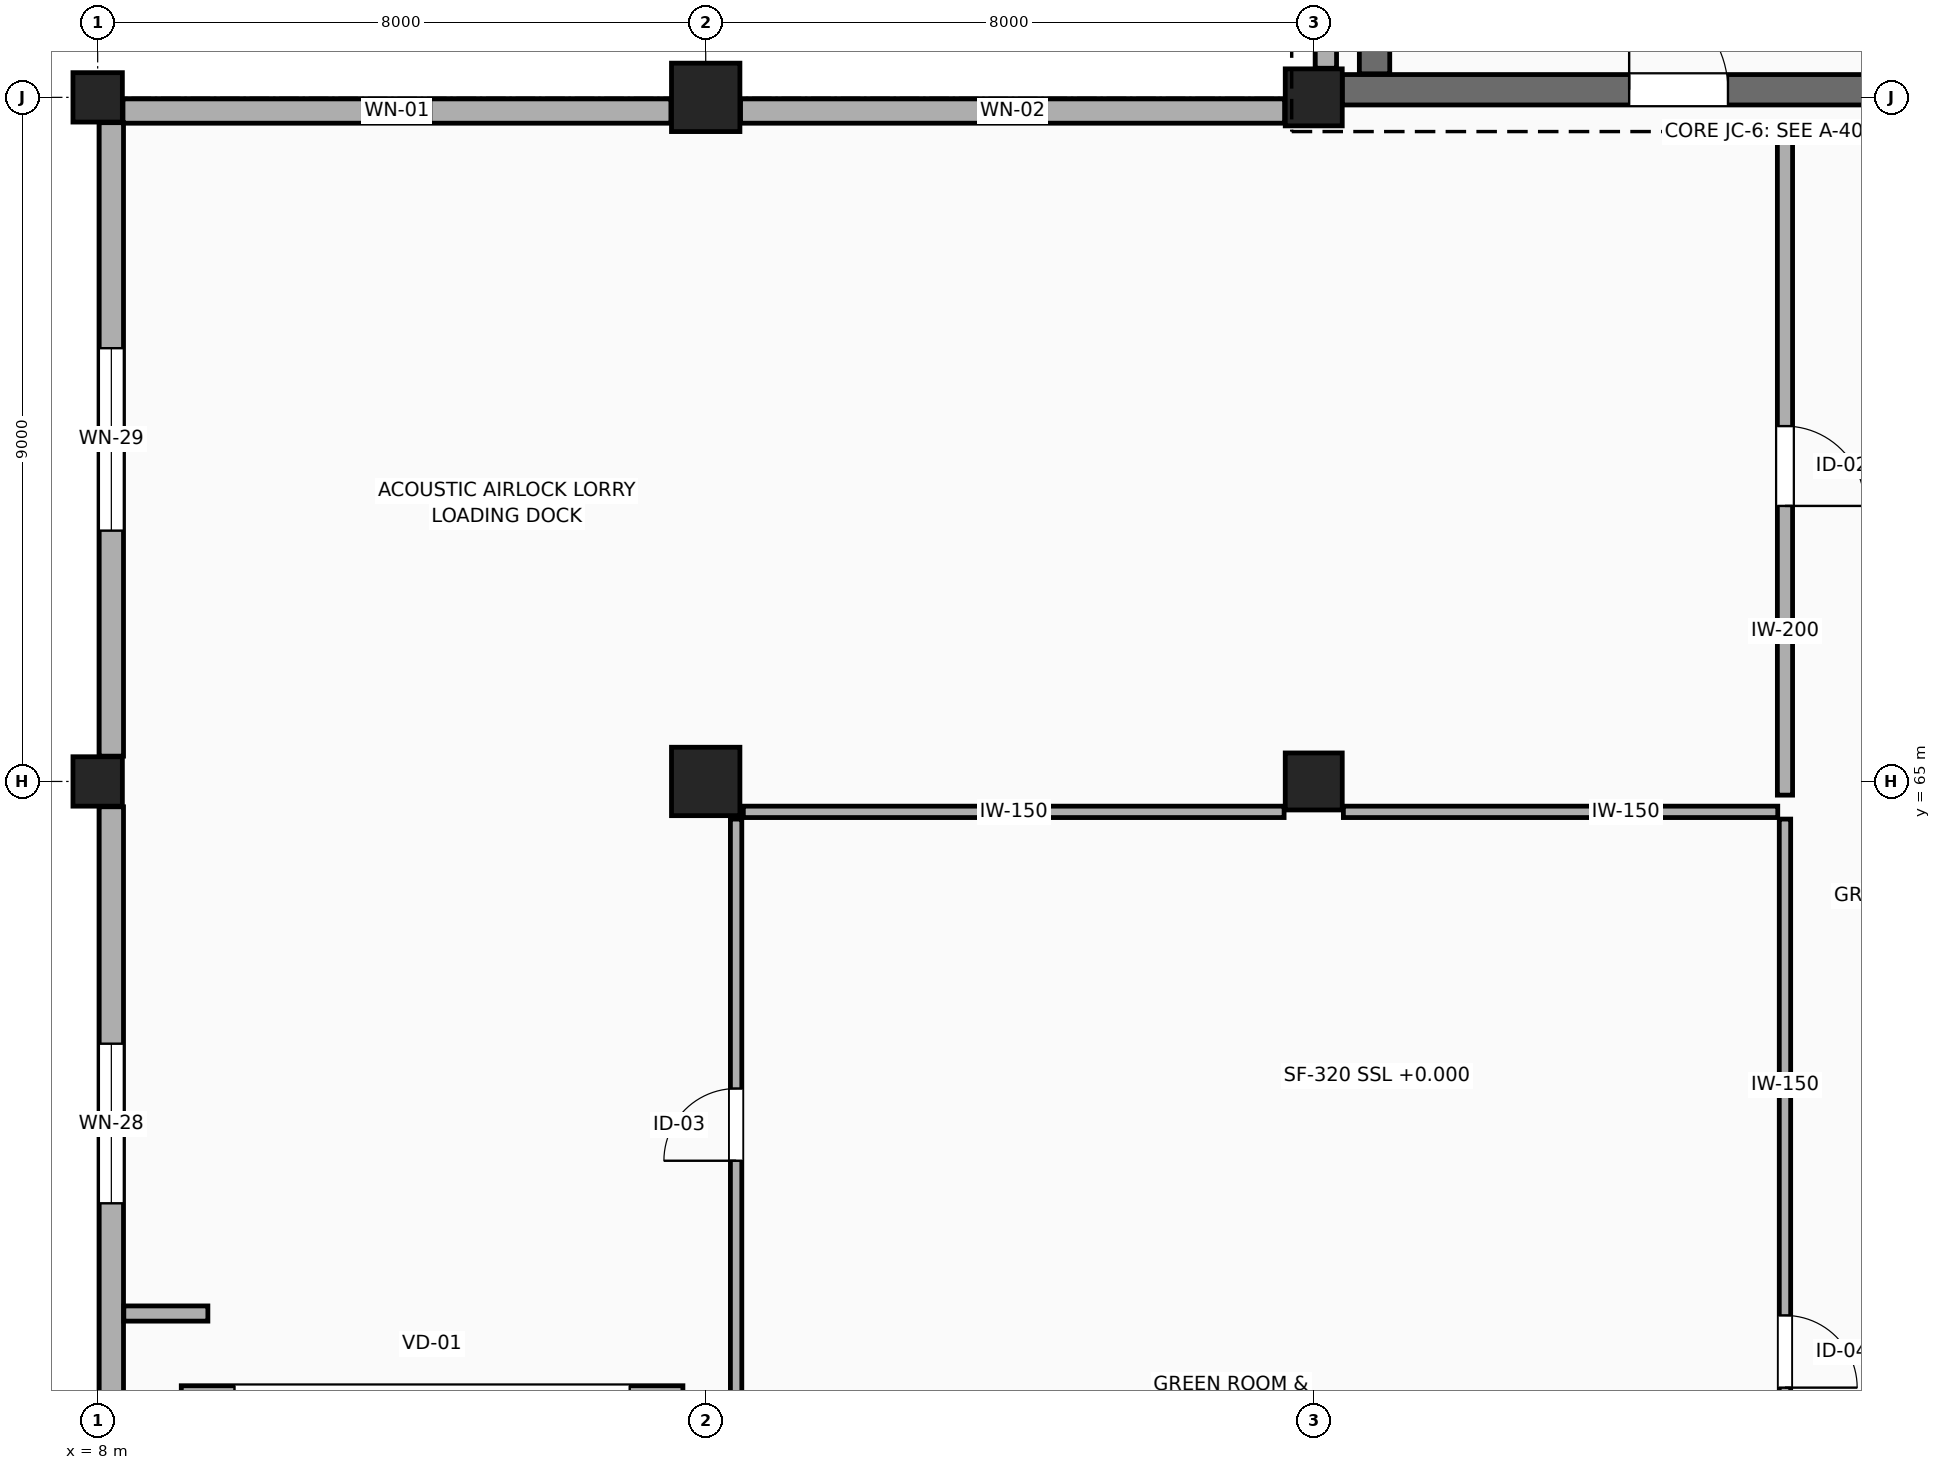
"""IFC4 building model, lengths in metres.
Left out: names, types, materials, properties, quantities, classifications, styles, units other than length and angle.
Written with IfcOpenShell. Run it as: python <this file> out.ifc"""

import sys

from ifc_helpers import new_model, si_unit, direction, frame, frame_2d, origin, origin_2d, place, context, subcontext, project, spatial, rectangle, extrude, element, fill, save


model = new_model("IFC4")
c1 = context("Model", 3, precision=1e-05, world=origin(), true_north=direction((0.0, 1.0)))
c2 = subcontext(c1, "Body", "Model", "MODEL_VIEW")
j1 = project(units=[si_unit("LENGTHUNIT", "METRE"), si_unit("PLANEANGLEUNIT", "RADIAN")], contexts=[c1])
p1 = place(None, origin())
s1 = spatial("IfcSite", under=j1, at=p1, CompositionType="ELEMENT")
p2 = place(p1, origin())
s2 = spatial("IfcBuilding", under=s1, at=p2, CompositionType="ELEMENT")
p3 = place(p2, origin())
s3 = spatial("IfcBuildingStorey", under=s2, at=p3, CompositionType="ELEMENT", Elevation=0.0)
for number, where, z_axis, x_axis in (
    (1, (8.0, 65.0, 0.0), (0.0, 0.0, 1.0), (1.0, 0.0, 0.0)),
    (2, (8.0, 74.0, 0.0), (0.0, 0.0, 1.0), (1.0, 0.0, 0.0)),
):
    element("IfcColumn", number, at=place(p3, frame(where, z_axis=z_axis, x_axis=x_axis)), inside=s3, PredefinedType="COLUMN", context=c2, shape_type="SweptSolid", body=[
        extrude(rectangle(XDim=0.65, YDim=0.65, at=origin_2d()), origin(), (0.0, 0.0, 1.0), 5.36),
    ])
for number, where, z_axis, x_axis in (
    (3, (16.0, 65.0, 0.0), (0.0, 0.0, 1.0), (1.0, 0.0, 0.0)),
    (4, (16.0, 74.0, 0.0), (0.0, 0.0, 1.0), (1.0, 0.0, 0.0)),
):
    element("IfcColumn", number, at=place(p3, frame(where, z_axis=z_axis, x_axis=x_axis)), inside=s3, PredefinedType="COLUMN", context=c2, shape_type="SweptSolid", body=[
        extrude(rectangle(XDim=0.9, YDim=0.9, at=origin_2d()), origin(), (0.0, 0.0, 1.0), 5.4),
    ])
for number, where, z_axis, x_axis in (
    (5, (24.0, 65.0, 0.0), (0.0, 0.0, 1.0), (1.0, 0.0, 0.0)),
    (6, (24.0, 74.0, 0.0), (0.0, 0.0, 1.0), (1.0, 0.0, 0.0)),
):
    element("IfcColumn", number, at=place(p3, frame(where, z_axis=z_axis, x_axis=x_axis)), inside=s3, PredefinedType="COLUMN", context=c2, shape_type="SweptSolid", body=[
        extrude(rectangle(XDim=0.75, YDim=0.75, at=origin_2d()), origin(), (0.0, 0.0, 1.0), 5.4),
    ])
p4 = place(p3, frame((8.333, 73.82, 0.0), z_axis=(0.0, 0.0, 1.0), x_axis=(1.0, 0.0, 0.0)))
e7 = element("IfcWall", 7, at=p4, inside=s3, PredefinedType="STANDARD", context=c2, shape_type="SweptSolid", body=[
    extrude(rectangle(XDim=7.209, YDim=0.32, at=frame_2d((3.604, 0.0))), origin(), (0.0, 0.0, 1.0), 4.605),
])
p5 = place(p4, frame((3.154, 0.0, 0.95)))
e8 = element("IfcOpeningElement", 8, at=p5, cuts=e7, PredefinedType="OPENING", context=c2, shape_type="SweptSolid", body=[
    extrude(rectangle(XDim=0.9, YDim=1.2, at=frame_2d((0.45, 0.6))), frame((0.0, 0.17, 0.0), z_axis=(0.0, -1.0, 0.0), x_axis=(1.0, 0.0, 0.0)), (0.0, 0.0, 1.0), 0.34),
])
p6 = place(p3, frame((16.458, 73.82, 0.0), z_axis=(0.0, 0.0, 1.0), x_axis=(1.0, 0.0, 0.0)))
e9 = element("IfcWall", 9, at=p6, inside=s3, PredefinedType="STANDARD", context=c2, shape_type="SweptSolid", body=[
    extrude(rectangle(XDim=7.159, YDim=0.32, at=frame_2d((3.58, 0.0))), origin(), (0.0, 0.0, 1.0), 4.655),
])
p7 = place(p6, frame((3.13, 0.0, 0.95)))
e10 = element("IfcOpeningElement", 10, at=p7, cuts=e9, PredefinedType="OPENING", context=c2, shape_type="SweptSolid", body=[
    extrude(rectangle(XDim=0.9, YDim=1.5, at=frame_2d((0.45, 0.75))), frame((0.0, 0.17, 0.0), z_axis=(0.0, -1.0, 0.0), x_axis=(1.0, 0.0, 0.0)), (0.0, 0.0, 1.0), 0.34),
])
p8 = place(p3, frame((24.16, 74.383, 0.0), z_axis=(0.0, 0.0, 1.0), x_axis=(0.0, 1.0, 0.0)))
e11 = element("IfcWall", 11, at=p8, inside=s3, PredefinedType="STANDARD", context=c2, shape_type="SweptSolid", body=[
    extrude(rectangle(XDim=8.284, YDim=0.28, at=frame_2d((4.142, 0.0))), origin(), (0.0, 0.0, 1.0), 4.755),
])
p9 = place(p8, frame((3.692, 0.0, 0.95)))
e12 = element("IfcOpeningElement", 12, at=p9, cuts=e11, PredefinedType="OPENING", context=c2, shape_type="SweptSolid", body=[
    extrude(rectangle(XDim=0.9, YDim=1.8, at=frame_2d((0.45, 0.9))), frame((0.0, 0.15, 0.0), z_axis=(0.0, -1.0, 0.0), x_axis=(1.0, 0.0, 0.0)), (0.0, 0.0, 1.0), 0.3),
])
p10 = place(p3, frame((8.18, 56.333, 0.0), z_axis=(0.0, 0.0, 1.0), x_axis=(0.0, 1.0, 0.0)))
e13 = element("IfcWall", 13, at=p10, inside=s3, PredefinedType="STANDARD", context=c2, shape_type="SweptSolid", body=[
    extrude(rectangle(XDim=8.334, YDim=0.32, at=frame_2d((4.167, 0.0))), origin(), (0.0, 0.0, 1.0), 4.655),
])
p11 = place(p10, frame((3.117, 0.0, 0.95)))
e14 = element("IfcOpeningElement", 14, at=p11, cuts=e13, PredefinedType="OPENING", context=c2, shape_type="SweptSolid", body=[
    extrude(rectangle(XDim=2.1, YDim=2.1, at=frame_2d((1.05, 1.05))), frame((0.0, 0.17, 0.0), z_axis=(0.0, -1.0, 0.0), x_axis=(1.0, 0.0, 0.0)), (0.0, 0.0, 1.0), 0.34),
])
p12 = place(p3, frame((8.18, 65.333, 0.0), z_axis=(0.0, 0.0, 1.0), x_axis=(0.0, 1.0, 0.0)))
e15 = element("IfcWall", 15, at=p12, inside=s3, PredefinedType="STANDARD", context=c2, shape_type="SweptSolid", body=[
    extrude(rectangle(XDim=8.334, YDim=0.32, at=frame_2d((4.167, 0.0))), origin(), (0.0, 0.0, 1.0), 4.105),
])
p13 = place(p12, frame((2.967, 0.0, 0.95)))
e16 = element("IfcOpeningElement", 16, at=p13, cuts=e15, PredefinedType="OPENING", context=c2, shape_type="SweptSolid", body=[
    extrude(rectangle(XDim=2.4, YDim=1.2, at=frame_2d((1.2, 0.6))), frame((0.0, 0.17, 0.0), z_axis=(0.0, -1.0, 0.0), x_axis=(1.0, 0.0, 0.0)), (0.0, 0.0, 1.0), 0.34),
])
p14 = place(p3, frame((9.1, 56.85, 0.0), z_axis=(0.0, 0.0, 1.0), x_axis=(1.0, 0.0, 0.0)))
e17 = element("IfcWall", 17, at=p14, inside=s3, PredefinedType="STANDARD", context=c2, shape_type="SweptSolid", body=[
    extrude(rectangle(XDim=6.6, YDim=0.4, at=frame_2d((3.3, 0.0))), origin(), (0.0, 0.0, 1.0), 4.85),
])
p15 = place(p14, frame((0.7, 0.0, 0.0)))
e18 = element("IfcOpeningElement", 18, at=p15, cuts=e17, PredefinedType="OPENING", context=c2, shape_type="SweptSolid", body=[
    extrude(rectangle(XDim=5.2, YDim=3.6, at=frame_2d((2.6, 1.8))), frame((0.0, 0.21, 0.0), z_axis=(0.0, -1.0, 0.0), x_axis=(1.0, 0.0, 0.0)), (0.0, 0.0, 1.0), 0.42),
])
p16 = place(p3, frame((24.374, 74.1, 0.0), z_axis=(0.0, 0.0, 1.0), x_axis=(1.0, 0.0, 0.0)))
e19 = element("IfcWall", 19, at=p16, inside=s3, PredefinedType="SHEAR", context=c2, shape_type="SweptSolid", body=[
    extrude(rectangle(XDim=8.626, YDim=0.4, at=frame_2d((4.313, 0.0))), origin(), (0.0, 0.0, 1.0), 5.12),
])
p17 = place(p16, frame((3.776, 0.0, 0.0)))
e20 = element("IfcOpeningElement", 20, at=p17, cuts=e19, PredefinedType="OPENING", context=c2, shape_type="SweptSolid", body=[
    extrude(rectangle(XDim=1.3, YDim=2.15, at=frame_2d((0.65, 1.075))), frame((0.0, 0.21, 0.0), z_axis=(0.0, -1.0, 0.0), x_axis=(1.0, 0.0, 0.0)), (0.0, 0.0, 1.0), 0.42),
])
p18 = place(p3, frame((24.8, 82.69, 0.0), z_axis=(0.0, 0.0, 1.0), x_axis=(0.0, -1.0, 0.0)))
e21 = element("IfcWall", 21, at=p18, inside=s3, PredefinedType="SHEAR", context=c2, shape_type="SweptSolid", body=[
    extrude(rectangle(XDim=8.38, YDim=0.4, at=frame_2d((4.19, 0.0))), origin(), (0.0, 0.0, 1.0), 5.12),
])
p19 = place(p3, frame((16.495, 64.6, 0.0), z_axis=(0.0, 0.0, 1.0), x_axis=(1.0, 0.0, 0.0)))
e22 = element("IfcWall", 22, at=p19, inside=s3, PredefinedType="PARTITIONING", context=c2, shape_type="SweptSolid", body=[
    extrude(rectangle(XDim=7.115, YDim=0.15, at=frame_2d((3.558, 0.0))), origin(), (0.0, 0.0, 1.0), 4.25),
])
p20 = place(p3, frame((24.39, 64.6, 0.0), z_axis=(0.0, 0.0, 1.0), x_axis=(1.0, 0.0, 0.0)))
e23 = element("IfcWall", 23, at=p20, inside=s3, PredefinedType="PARTITIONING", context=c2, shape_type="SweptSolid", body=[
    extrude(rectangle(XDim=5.715, YDim=0.15, at=frame_2d((2.857, 0.0))), origin(), (0.0, 0.0, 1.0), 4.35),
])
p21 = place(p3, frame((30.2, 64.505, 0.0), z_axis=(0.0, 0.0, 1.0), x_axis=(0.0, -1.0, 0.0)))
e24 = element("IfcWall", 24, at=p21, inside=s3, PredefinedType="PARTITIONING", context=c2, shape_type="SweptSolid", body=[
    extrude(rectangle(XDim=14.01, YDim=0.15, at=frame_2d((7.005, 0.0))), origin(), (0.0, 0.0, 1.0), 5.11),
])
p22 = place(p21, frame((6.53, 0.0, 0.0)))
e25 = element("IfcOpeningElement", 25, at=p22, cuts=e24, PredefinedType="OPENING", context=c2, shape_type="SweptSolid", body=[
    extrude(rectangle(XDim=0.95, YDim=2.15, at=frame_2d((0.475, 1.075))), frame((0.0, 0.085, 0.0), z_axis=(0.0, -1.0, 0.0), x_axis=(1.0, 0.0, 0.0)), (0.0, 0.0, 1.0), 0.17),
])
p23 = place(p3, frame((16.4, 56.465, 0.0), z_axis=(0.0, 0.0, 1.0), x_axis=(0.0, 1.0, 0.0)))
e26 = element("IfcWall", 26, at=p23, inside=s3, PredefinedType="PARTITIONING", context=c2, shape_type="SweptSolid", body=[
    extrude(rectangle(XDim=8.04, YDim=0.15, at=frame_2d((4.02, 0.0))), origin(), (0.0, 0.0, 1.0), 5.4),
])
p24 = place(p23, frame((3.545, 0.0, 0.0)))
e27 = element("IfcOpeningElement", 27, at=p24, cuts=e26, PredefinedType="OPENING", context=c2, shape_type="SweptSolid", body=[
    extrude(rectangle(XDim=0.95, YDim=2.15, at=frame_2d((0.475, 1.075))), frame((0.0, 0.085, 0.0), z_axis=(0.0, -1.0, 0.0), x_axis=(1.0, 0.0, 0.0)), (0.0, 0.0, 1.0), 0.17),
])
p25 = place(p3, frame((30.2, 73.48, 0.0), z_axis=(0.0, 0.0, 1.0), x_axis=(0.0, -1.0, 0.0)))
e28 = element("IfcWall", 28, at=p25, inside=s3, PredefinedType="PARTITIONING", context=c2, shape_type="SweptSolid", body=[
    extrude(rectangle(XDim=8.66, YDim=0.2, at=frame_2d((4.33, 0.0))), origin(), (0.0, 0.0, 1.0), 5.11),
])
p26 = place(p25, frame((3.805, 0.0, 0.0)))
e29 = element("IfcOpeningElement", 29, at=p26, cuts=e28, PredefinedType="OPENING", context=c2, shape_type="SweptSolid", body=[
    extrude(rectangle(XDim=1.05, YDim=2.15, at=frame_2d((0.525, 1.075))), frame((0.0, 0.11, 0.0), z_axis=(0.0, -1.0, 0.0), x_axis=(1.0, 0.0, 0.0)), (0.0, 0.0, 1.0), 0.22),
])
p27 = place(p3, frame((9.45, 58.0, 0.0), z_axis=(0.0, 0.0, 1.0), x_axis=(-1.0, 0.0, 0.0)))
e30 = element("IfcWall", 30, at=p27, inside=s3, PredefinedType="PARTITIONING", context=c2, shape_type="SweptSolid", body=[
    extrude(rectangle(XDim=1.106, YDim=0.2, at=frame_2d((0.553, 0.0))), origin(), (0.0, 0.0, 1.0), 5.17),
])
p28 = place(p5, origin())
e31 = element("IfcWindow", 31, at=p28, inside=s3, PartitioningType="SINGLE_PANEL", PredefinedType="WINDOW", context=c2, shape_type="SweptSolid", body=[
    extrude(rectangle(XDim=0.9, YDim=1.2, at=frame_2d((0.45, 0.6))), frame((0.0, 0.03, 0.0), z_axis=(0.0, -1.0, 0.0), x_axis=(1.0, 0.0, 0.0)), (0.0, 0.0, 1.0), 0.06),
])
fill(e8, e31)
p29 = place(p7, origin())
e32 = element("IfcWindow", 32, at=p29, inside=s3, PartitioningType="SINGLE_PANEL", PredefinedType="WINDOW", context=c2, shape_type="SweptSolid", body=[
    extrude(rectangle(XDim=0.9, YDim=1.5, at=frame_2d((0.45, 0.75))), frame((0.0, 0.03, 0.0), z_axis=(0.0, -1.0, 0.0), x_axis=(1.0, 0.0, 0.0)), (0.0, 0.0, 1.0), 0.06),
])
fill(e10, e32)
p30 = place(p11, origin())
e33 = element("IfcWindow", 33, at=p30, inside=s3, PartitioningType="SINGLE_PANEL", PredefinedType="LIGHTDOME", context=c2, shape_type="SweptSolid", body=[
    extrude(rectangle(XDim=2.1, YDim=2.1, at=frame_2d((1.05, 1.05))), frame((0.0, 0.03, 0.0), z_axis=(0.0, -1.0, 0.0), x_axis=(1.0, 0.0, 0.0)), (0.0, 0.0, 1.0), 0.06),
])
fill(e14, e33)
p31 = place(p13, origin())
e34 = element("IfcWindow", 34, at=p31, inside=s3, PartitioningType="SINGLE_PANEL", PredefinedType="SKYLIGHT", context=c2, shape_type="SweptSolid", body=[
    extrude(rectangle(XDim=2.4, YDim=1.2, at=frame_2d((1.2, 0.6))), frame((0.0, 0.03, 0.0), z_axis=(0.0, -1.0, 0.0), x_axis=(1.0, 0.0, 0.0)), (0.0, 0.0, 1.0), 0.06),
])
fill(e16, e34)
p32 = place(p17, origin())
e35 = element("IfcDoor", 35, at=p32, inside=s3, OperationType="SINGLE_SWING_LEFT", PredefinedType="DOOR", context=c2, shape_type="SweptSolid", body=[
    extrude(rectangle(XDim=1.3, YDim=2.15, at=frame_2d((0.65, 1.075))), frame((0.0, 0.025, 0.0), z_axis=(0.0, -1.0, 0.0), x_axis=(1.0, 0.0, 0.0)), (0.0, 0.0, 1.0), 0.05),
])
fill(e20, e35)
p33 = place(p22, origin())
e36 = element("IfcDoor", 36, at=p33, inside=s3, OperationType="SINGLE_SWING_RIGHT", PredefinedType="DOOR", context=c2, shape_type="SweptSolid", body=[
    extrude(rectangle(XDim=0.95, YDim=2.15, at=frame_2d((0.475, 1.075))), frame((0.0, 0.025, 0.0), z_axis=(0.0, -1.0, 0.0), x_axis=(1.0, 0.0, 0.0)), (0.0, 0.0, 1.0), 0.05),
])
fill(e25, e36)
p34 = place(p26, origin())
e37 = element("IfcDoor", 37, at=p34, inside=s3, OperationType="SINGLE_SWING_RIGHT", PredefinedType="DOOR", context=c2, shape_type="SweptSolid", body=[
    extrude(rectangle(XDim=1.05, YDim=2.15, at=frame_2d((0.525, 1.075))), frame((0.0, 0.025, 0.0), z_axis=(0.0, -1.0, 0.0), x_axis=(1.0, 0.0, 0.0)), (0.0, 0.0, 1.0), 0.05),
])
fill(e29, e37)
p35 = place(p24, origin())
e38 = element("IfcDoor", 38, at=p35, inside=s3, OperationType="SINGLE_SWING_LEFT", PredefinedType="DOOR", context=c2, shape_type="SweptSolid", body=[
    extrude(rectangle(XDim=0.95, YDim=2.15, at=frame_2d((0.475, 1.075))), frame((0.0, 0.025, 0.0), z_axis=(0.0, -1.0, 0.0), x_axis=(1.0, 0.0, 0.0)), (0.0, 0.0, 1.0), 0.05),
])
fill(e27, e38)
save(model, sys.argv[1])
